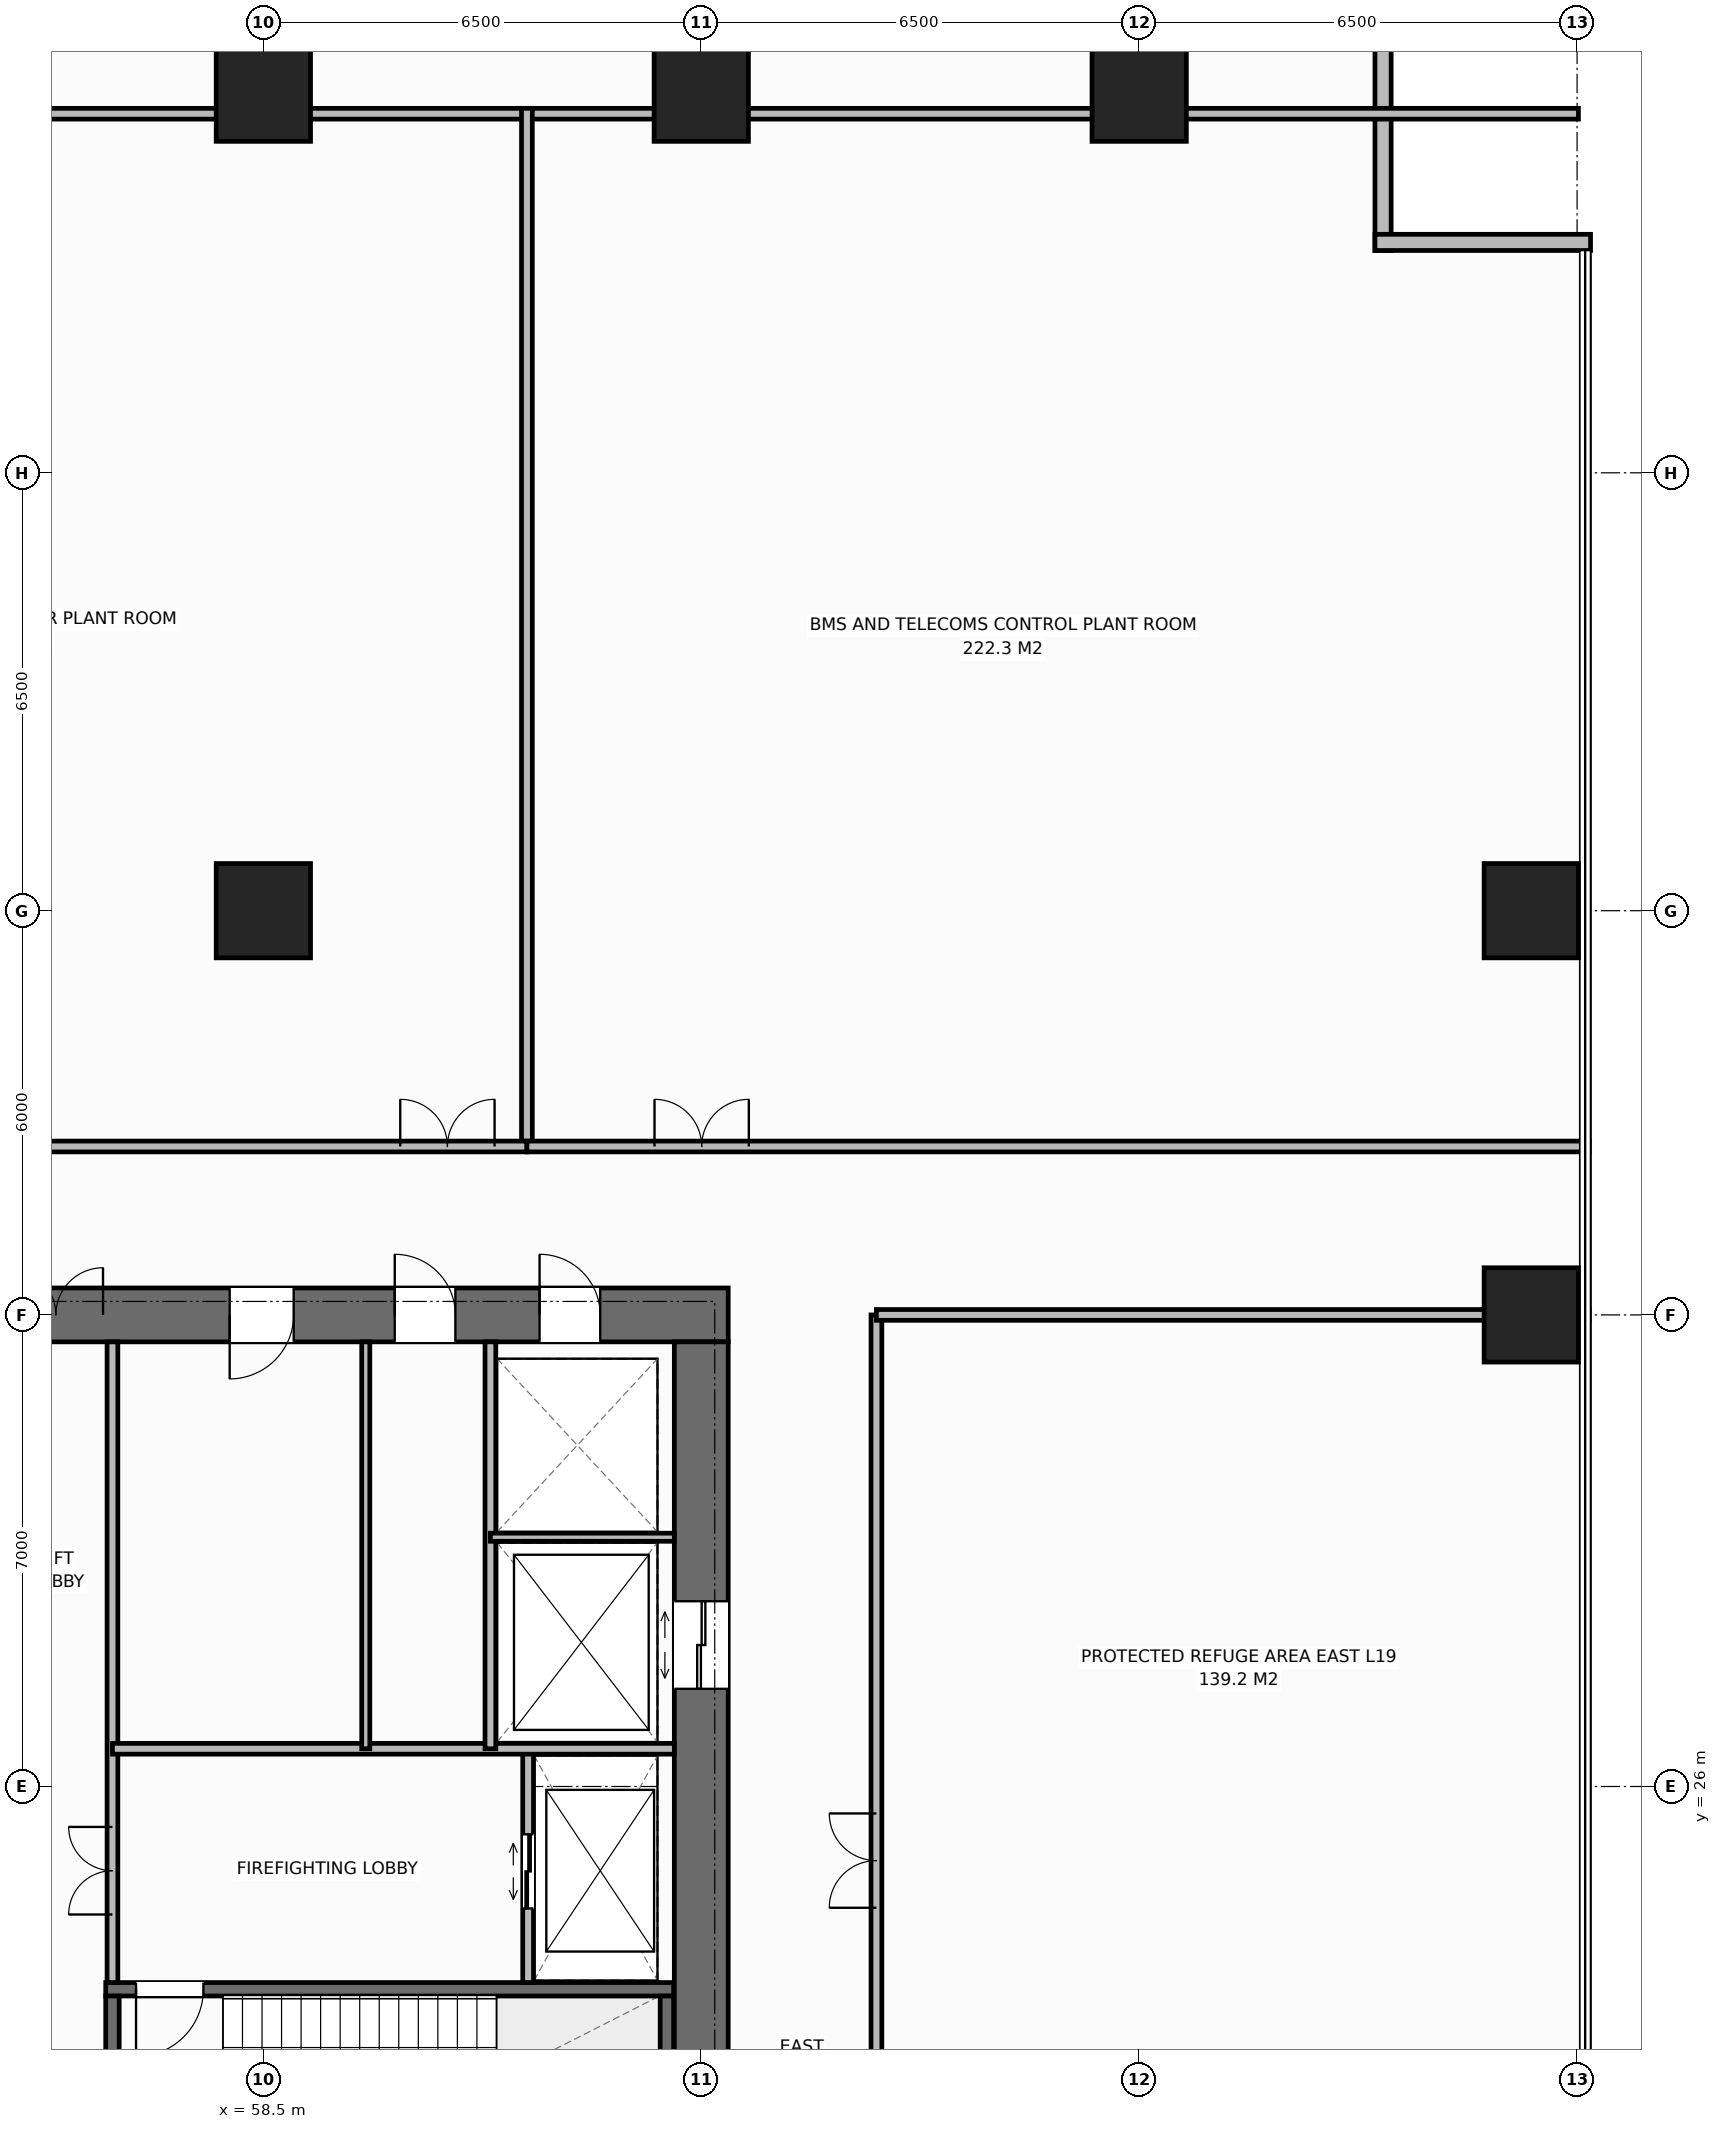
"""IFC4 building model, lengths in metres.
Left out: names, types, materials, properties, quantities, classifications, styles, units other than length and angle.
Written with IfcOpenShell. Run it as: python <this file> out.ifc"""

import sys

from ifc_helpers import new_model, si_unit, direction, frame, frame_2d, origin, origin_2d, place, context, subcontext, project, spatial, rectangle, extrude, element, fill, save


model = new_model("IFC4")
c1 = context("Model", 3, precision=1e-05, world=origin(), true_north=direction((0.0, 1.0)))
c2 = subcontext(c1, "Body", "Model", "MODEL_VIEW")
j1 = project(units=[si_unit("LENGTHUNIT", "METRE"), si_unit("PLANEANGLEUNIT", "RADIAN")], contexts=[c1])
p1 = place(None, origin())
s1 = spatial("IfcSite", under=j1, at=p1, CompositionType="ELEMENT")
p2 = place(p1, origin())
s2 = spatial("IfcBuilding", under=s1, at=p2, CompositionType="ELEMENT")
p3 = place(p2, frame((0.0, 0.0, 81.0)))
s3 = spatial("IfcBuildingStorey", under=s2, at=p3, CompositionType="ELEMENT", Elevation=81.0)
p4 = place(p3, frame((51.6, 33.0, 0.0), z_axis=(0.0, 0.0, 1.0), x_axis=(1.0, 0.0, 0.0)))
e1 = element("IfcWall", 1, at=p4, inside=s3, PredefinedType="SHEAR", context=c2, shape_type="SweptSolid", body=[
    extrude(rectangle(XDim=13.8, YDim=0.8, at=frame_2d((6.9, 0.0))), origin(), (0.0, 0.0, 1.0), 5.0),
])
p5 = place(p4, frame((3.12, 0.0, 0.0)))
e2 = element("IfcOpeningElement", 2, at=p5, cuts=e1, PredefinedType="OPENING", context=c2, shape_type="SweptSolid", body=[
    extrude(rectangle(XDim=1.4, YDim=2.2, at=frame_2d((0.7, 1.1))), frame((0.0, 0.41, 0.0), z_axis=(0.0, -1.0, 0.0), x_axis=(1.0, 0.0, 0.0)), (0.0, 0.0, 1.0), 0.82),
])
p6 = place(p4, frame((11.0, 0.0, 0.0)))
e3 = element("IfcOpeningElement", 3, at=p6, cuts=e1, PredefinedType="OPENING", context=c2, shape_type="SweptSolid", body=[
    extrude(rectangle(XDim=0.9, YDim=2.15, at=frame_2d((0.45, 1.075))), frame((0.0, 0.41, 0.0), z_axis=(0.0, -1.0, 0.0), x_axis=(1.0, 0.0, 0.0)), (0.0, 0.0, 1.0), 0.82),
])
p7 = place(p4, frame((6.4, 0.0, 0.0)))
e4 = element("IfcOpeningElement", 4, at=p7, cuts=e1, PredefinedType="OPENING", context=c2, shape_type="SweptSolid", body=[
    extrude(rectangle(XDim=0.95, YDim=2.15, at=frame_2d((0.475, 1.075))), frame((0.0, 0.41, 0.0), z_axis=(0.0, -1.0, 0.0), x_axis=(1.0, 0.0, 0.0)), (0.0, 0.0, 1.0), 0.82),
])
p8 = place(p4, frame((8.85, 0.0, 0.0)))
e5 = element("IfcOpeningElement", 5, at=p8, cuts=e1, PredefinedType="OPENING", context=c2, shape_type="SweptSolid", body=[
    extrude(rectangle(XDim=0.9, YDim=2.15, at=frame_2d((0.45, 1.075))), frame((0.0, 0.41, 0.0), z_axis=(0.0, -1.0, 0.0), x_axis=(1.0, 0.0, 0.0)), (0.0, 0.0, 1.0), 0.82),
])
p9 = place(p3, frame((65.0, 19.4, 0.0), z_axis=(0.0, 0.0, 1.0), x_axis=(0.0, 1.0, 0.0)))
e6 = element("IfcWall", 6, at=p9, inside=s3, PredefinedType="SHEAR", context=c2, shape_type="SweptSolid", body=[
    extrude(rectangle(XDim=13.2, YDim=0.8, at=frame_2d((6.6, 0.0))), origin(), (0.0, 0.0, 1.0), 5.0),
])
p10 = place(p9, frame((8.05, 0.0, 0.0)))
e7 = element("IfcOpeningElement", 7, at=p10, cuts=e6, PredefinedType="OPENING", context=c2, shape_type="SweptSolid", body=[
    extrude(rectangle(XDim=1.3, YDim=2.2, at=frame_2d((0.65, 1.1))), frame((0.0, 0.41, 0.0), z_axis=(0.0, -1.0, 0.0), x_axis=(1.0, 0.0, 0.0)), (0.0, 0.0, 1.0), 0.82),
])
p11 = place(p3, frame((56.16, 22.99, 0.0), z_axis=(0.0, 0.0, 1.0), x_axis=(1.0, 0.0, 0.0)))
e8 = element("IfcWall", 8, at=p11, inside=s3, PredefinedType="SHEAR", context=c2, shape_type="SweptSolid", body=[
    extrude(rectangle(XDim=8.43, YDim=0.2, at=frame_2d((4.215, 0.0))), origin(), (0.0, 0.0, 1.0), 5.0),
])
p12 = place(p11, frame((0.45, 0.0, 0.0)))
e9 = element("IfcOpeningElement", 9, at=p12, cuts=e8, PredefinedType="OPENING", context=c2, shape_type="SweptSolid", body=[
    extrude(rectangle(XDim=1.0, YDim=2.15, at=frame_2d((0.5, 1.075))), frame((0.0, 0.11, 0.0), z_axis=(0.0, -1.0, 0.0), x_axis=(1.0, 0.0, 0.0)), (0.0, 0.0, 1.0), 0.22),
])
for number, where, z_axis, x_axis in (
    (10, (56.26, 19.61, 0.0), (0.0, 0.0, 1.0), (0.0, 1.0, 0.0)),
    (11, (64.49, 19.61, 0.0), (0.0, 0.0, 1.0), (0.0, 1.0, 0.0)),
):
    element("IfcWall", number, at=place(p3, frame(where, z_axis=z_axis, x_axis=x_axis)), inside=s3, PredefinedType="SHEAR", context=c2, shape_type="SweptSolid", body=[
        extrude(rectangle(XDim=3.28, YDim=0.2, at=frame_2d((1.64, 0.0))), origin(), (0.0, 0.0, 1.0), 5.0),
    ])
for number, where, z_axis, x_axis in (
    (12, (58.5, 39.0, 0.0), (0.0, 0.0, 1.0), (1.0, 0.0, 0.0)),
    (13, (58.5, 51.12, 0.0), (0.0, 0.0, 1.0), (1.0, 0.0, 0.0)),
    (14, (65.0, 51.12, 0.0), (0.0, 0.0, 1.0), (1.0, 0.0, 0.0)),
    (15, (71.5, 51.12, 0.0), (0.0, 0.0, 1.0), (1.0, 0.0, 0.0)),
    (16, (77.32, 33.0, 0.0), (0.0, 0.0, 1.0), (1.0, 0.0, 0.0)),
    (17, (77.32, 39.0, 0.0), (0.0, 0.0, 1.0), (1.0, 0.0, 0.0)),
):
    element("IfcColumn", number, at=place(p3, frame(where, z_axis=z_axis, x_axis=x_axis)), inside=s3, PredefinedType="COLUMN", context=c2, shape_type="SweptSolid", body=[
        extrude(rectangle(XDim=1.4, YDim=1.4, at=origin_2d()), origin(), (0.0, 0.0, 1.0), 5.0),
    ])
for number, where, z_axis, x_axis in (
    (18, (75.12, 52.0, 0.0), (0.0, 0.0, 1.0), (0.0, -1.0, 0.0)),
    (19, (75.0, 48.92, 0.0), (0.0, 0.0, 1.0), (1.0, 0.0, 0.0)),
):
    element("IfcWall", number, at=place(p3, frame(where, z_axis=z_axis, x_axis=x_axis)), inside=s3, PredefinedType="STANDARD", context=c2, shape_type="SweptSolid", body=[
        extrude(rectangle(XDim=3.2, YDim=0.24, at=frame_2d((1.6, 0.0))), origin(), (0.0, 0.0, 1.0), 4.765),
    ])
p13 = place(p3, frame((56.26, 23.09, 0.0), z_axis=(0.0, 0.0, 1.0), x_axis=(0.0, 1.0, 0.0)))
e20 = element("IfcWall", 20, at=p13, inside=s3, PredefinedType="STANDARD", context=c2, shape_type="SweptSolid", body=[
    extrude(rectangle(XDim=9.51, YDim=0.16, at=frame_2d((4.755, 0.0))), origin(), (0.0, 0.0, 1.0), 4.765),
])
p14 = place(p13, frame((1.01, 0.0, 0.0)))
e21 = element("IfcOpeningElement", 21, at=p14, cuts=e20, PredefinedType="OPENING", context=c2, shape_type="SweptSolid", body=[
    extrude(rectangle(XDim=1.3, YDim=2.2, at=frame_2d((0.65, 1.1))), frame((0.0, 0.09, 0.0), z_axis=(0.0, -1.0, 0.0), x_axis=(1.0, 0.0, 0.0)), (0.0, 0.0, 1.0), 0.18),
])
p15 = place(p3, frame((62.43, 23.09, 0.0), z_axis=(0.0, 0.0, 1.0), x_axis=(0.0, 1.0, 0.0)))
e22 = element("IfcWall", 22, at=p15, inside=s3, PredefinedType="STANDARD", context=c2, shape_type="SweptSolid", body=[
    extrude(rectangle(XDim=3.47, YDim=0.16, at=frame_2d((1.735, 0.0))), origin(), (0.0, 0.0, 1.0), 4.765),
])
p16 = place(p15, frame((1.1, 0.0, 0.0)))
e23 = element("IfcOpeningElement", 23, at=p16, cuts=e22, PredefinedType="OPENING", context=c2, shape_type="SweptSolid", body=[
    extrude(rectangle(XDim=1.1, YDim=2.2, at=frame_2d((0.55, 1.1))), frame((0.0, 0.09, 0.0), z_axis=(0.0, -1.0, 0.0), x_axis=(1.0, 0.0, 0.0)), (0.0, 0.0, 1.0), 0.18),
])
p17 = place(p3, frame((56.26, 26.56, 0.0), z_axis=(0.0, 0.0, 1.0), x_axis=(1.0, 0.0, 0.0)))
e24 = element("IfcWall", 24, at=p17, inside=s3, PredefinedType="STANDARD", context=c2, shape_type="SweptSolid", body=[
    extrude(rectangle(XDim=8.34, YDim=0.16, at=frame_2d((4.17, 0.0))), origin(), (0.0, 0.0, 1.0), 4.765),
])
p18 = place(p3, frame((61.87, 26.56, 0.0), z_axis=(0.0, 0.0, 1.0), x_axis=(0.0, 1.0, 0.0)))
e25 = element("IfcWall", 25, at=p18, inside=s3, PredefinedType="STANDARD", context=c2, shape_type="SweptSolid", body=[
    extrude(rectangle(XDim=6.04, YDim=0.16, at=frame_2d((3.02, 0.0))), origin(), (0.0, 0.0, 1.0), 4.765),
])
p19 = place(p3, frame((61.87, 29.7, 0.0), z_axis=(0.0, 0.0, 1.0), x_axis=(1.0, 0.0, 0.0)))
e26 = element("IfcWall", 26, at=p19, inside=s3, PredefinedType="PARTITIONING", context=c2, shape_type="SweptSolid", body=[
    extrude(rectangle(XDim=2.73, YDim=0.12, at=frame_2d((1.365, 0.0))), origin(), (0.0, 0.0, 1.0), 4.765),
])
p20 = place(p3, frame((60.02, 26.56, 0.0), z_axis=(0.0, 0.0, 1.0), x_axis=(0.0, 1.0, 0.0)))
e27 = element("IfcWall", 27, at=p20, inside=s3, PredefinedType="PARTITIONING", context=c2, shape_type="SweptSolid", body=[
    extrude(rectangle(XDim=6.04, YDim=0.12, at=frame_2d((3.02, 0.0))), origin(), (0.0, 0.0, 1.0), 4.765),
])
p21 = place(p3, frame((-0.02, 50.83, 0.0), z_axis=(0.0, 0.0, 1.0), x_axis=(1.0, 0.0, 0.0)))
e28 = element("IfcWall", 28, at=p21, inside=s3, PredefinedType="STANDARD", context=c2, shape_type="SweptSolid", body=[
    extrude(rectangle(XDim=78.04, YDim=0.16, at=frame_2d((39.02, 0.0))), origin(), (0.0, 0.0, 1.0), 4.765),
])
p22 = place(p3, frame((67.6, 19.0, 0.0), z_axis=(0.0, 0.0, 1.0), x_axis=(0.0, 1.0, 0.0)))
e29 = element("IfcWall", 29, at=p22, inside=s3, PredefinedType="STANDARD", context=c2, shape_type="SweptSolid", body=[
    extrude(rectangle(XDim=14.0, YDim=0.16, at=frame_2d((7.0, 0.0))), origin(), (0.0, 0.0, 1.0), 4.765),
])
p23 = place(p22, frame((5.2, 0.0, 0.0)))
e30 = element("IfcOpeningElement", 30, at=p23, cuts=e29, PredefinedType="OPENING", context=c2, shape_type="SweptSolid", body=[
    extrude(rectangle(XDim=1.4, YDim=2.2, at=frame_2d((0.7, 1.1))), frame((0.0, 0.09, 0.0), z_axis=(0.0, -1.0, 0.0), x_axis=(1.0, 0.0, 0.0)), (0.0, 0.0, 1.0), 0.18),
])
p24 = place(p3, frame((67.6, 33.0, 0.0), z_axis=(0.0, 0.0, 1.0), x_axis=(1.0, 0.0, 0.0)))
e31 = element("IfcWall", 31, at=p24, inside=s3, PredefinedType="STANDARD", context=c2, shape_type="SweptSolid", body=[
    extrude(rectangle(XDim=10.58, YDim=0.16, at=frame_2d((5.29, 0.0))), origin(), (0.0, 0.0, 1.0), 3.245),
])
p25 = place(p3, frame((62.412, 35.5, 0.0), z_axis=(0.0, 0.0, 1.0), x_axis=(0.0, 1.0, 0.0)))
e32 = element("IfcWall", 32, at=p25, inside=s3, PredefinedType="STANDARD", context=c2, shape_type="SweptSolid", body=[
    extrude(rectangle(XDim=15.41, YDim=0.16, at=frame_2d((7.705, 0.0))), origin(), (0.0, 0.0, 1.0), 4.765),
])
p26 = place(p3, frame((43.682, 35.5, 0.0), z_axis=(0.0, 0.0, 1.0), x_axis=(1.0, 0.0, 0.0)))
e33 = element("IfcWall", 33, at=p26, inside=s3, PredefinedType="STANDARD", context=c2, shape_type="SweptSolid", body=[
    extrude(rectangle(XDim=18.73, YDim=0.16, at=frame_2d((9.365, 0.0))), origin(), (0.0, 0.0, 1.0), 4.765),
])
p27 = place(p26, frame((16.85, 0.0, 0.0)))
e34 = element("IfcOpeningElement", 34, at=p27, cuts=e33, PredefinedType="OPENING", context=c2, shape_type="SweptSolid", body=[
    extrude(rectangle(XDim=1.4, YDim=2.2, at=frame_2d((0.7, 1.1))), frame((0.0, 0.09, 0.0), z_axis=(0.0, -1.0, 0.0), x_axis=(1.0, 0.0, 0.0)), (0.0, 0.0, 1.0), 0.18),
])
p28 = place(p3, frame((62.412, 35.5, 0.0), z_axis=(0.0, 0.0, 1.0), x_axis=(1.0, 0.0, 0.0)))
e35 = element("IfcWall", 35, at=p28, inside=s3, PredefinedType="STANDARD", context=c2, shape_type="SweptSolid", body=[
    extrude(rectangle(XDim=15.768, YDim=0.16, at=frame_2d((7.884, 0.0))), origin(), (0.0, 0.0, 1.0), 4.765),
])
p29 = place(p28, frame((1.894, 0.0, 0.0)))
e36 = element("IfcOpeningElement", 36, at=p29, cuts=e35, PredefinedType="OPENING", context=c2, shape_type="SweptSolid", body=[
    extrude(rectangle(XDim=1.4, YDim=2.2, at=frame_2d((0.7, 1.1))), frame((0.0, 0.09, 0.0), z_axis=(0.0, -1.0, 0.0), x_axis=(1.0, 0.0, 0.0)), (0.0, 0.0, 1.0), 0.18),
])
p30 = place(p5, origin())
e37 = element("IfcDoor", 37, at=p30, inside=s3, OperationType="DOUBLE_DOOR_SINGLE_SWING", PredefinedType="DOOR", context=c2, shape_type="SweptSolid", body=[
    extrude(rectangle(XDim=1.4, YDim=2.2, at=frame_2d((0.7, 1.1))), frame((0.0, -0.075, 0.0), z_axis=(0.0, -1.0, 0.0), x_axis=(1.0, 0.0, 0.0)), (0.0, 0.0, 1.0), 0.05),
])
fill(e2, e37)
p31 = place(p12, origin())
e38 = element("IfcDoor", 38, at=p31, inside=s3, OperationType="SINGLE_SWING_RIGHT", PredefinedType="DOOR", context=c2, shape_type="SweptSolid", body=[
    extrude(rectangle(XDim=1.0, YDim=2.15, at=frame_2d((0.5, 1.075))), frame((0.0, 0.025, 0.0), z_axis=(0.0, -1.0, 0.0), x_axis=(1.0, 0.0, 0.0)), (0.0, 0.0, 1.0), 0.05),
])
fill(e9, e38)
p32 = place(p16, origin())
e39 = element("IfcDoor", 39, at=p32, inside=s3, OperationType="DOUBLE_DOOR_SLIDING", PredefinedType="DOOR", context=c2, shape_type="SweptSolid", body=[
    extrude(rectangle(XDim=1.1, YDim=2.2, at=frame_2d((0.55, 1.1))), frame((0.0, 0.025, 0.0), z_axis=(0.0, -1.0, 0.0), x_axis=(1.0, 0.0, 0.0)), (0.0, 0.0, 1.0), 0.05),
])
fill(e23, e39)
p33 = place(p14, origin())
e40 = element("IfcDoor", 40, at=p33, inside=s3, OperationType="DOUBLE_DOOR_SINGLE_SWING", PredefinedType="DOOR", context=c2, shape_type="SweptSolid", body=[
    extrude(rectangle(XDim=1.3, YDim=2.2, at=frame_2d((0.65, 1.1))), frame((0.0, 0.025, 0.0), z_axis=(0.0, -1.0, 0.0), x_axis=(1.0, 0.0, 0.0)), (0.0, 0.0, 1.0), 0.05),
])
fill(e21, e40)
p34 = place(p10, origin())
e41 = element("IfcDoor", 41, at=p34, inside=s3, OperationType="DOUBLE_DOOR_SLIDING", PredefinedType="DOOR", context=c2, shape_type="SweptSolid", body=[
    extrude(rectangle(XDim=1.3, YDim=2.2, at=frame_2d((0.65, 1.1))), frame((0.0, 0.025, 0.0), z_axis=(0.0, -1.0, 0.0), x_axis=(1.0, 0.0, 0.0)), (0.0, 0.0, 1.0), 0.05),
])
fill(e7, e41)
p35 = place(p6, origin())
e42 = element("IfcDoor", 42, at=p35, inside=s3, OperationType="SINGLE_SWING_LEFT", PredefinedType="DOOR", context=c2, shape_type="SweptSolid", body=[
    extrude(rectangle(XDim=0.9, YDim=2.15, at=frame_2d((0.45, 1.075))), frame((0.0, -0.075, 0.0), z_axis=(0.0, -1.0, 0.0), x_axis=(1.0, 0.0, 0.0)), (0.0, 0.0, 1.0), 0.05),
])
fill(e3, e42)
p36 = place(p7, origin())
e43 = element("IfcDoor", 43, at=p36, inside=s3, OperationType="SINGLE_SWING_RIGHT", PredefinedType="DOOR", context=c2, shape_type="SweptSolid", body=[
    extrude(rectangle(XDim=0.95, YDim=2.15, at=frame_2d((0.475, 1.075))), frame((0.0, -0.075, 0.0), z_axis=(0.0, -1.0, 0.0), x_axis=(1.0, 0.0, 0.0)), (0.0, 0.0, 1.0), 0.05),
])
fill(e4, e43)
p37 = place(p8, origin())
e44 = element("IfcDoor", 44, at=p37, inside=s3, OperationType="SINGLE_SWING_LEFT", PredefinedType="DOOR", context=c2, shape_type="SweptSolid", body=[
    extrude(rectangle(XDim=0.9, YDim=2.15, at=frame_2d((0.45, 1.075))), frame((0.0, -0.075, 0.0), z_axis=(0.0, -1.0, 0.0), x_axis=(1.0, 0.0, 0.0)), (0.0, 0.0, 1.0), 0.05),
])
fill(e5, e44)
p38 = place(p23, origin())
e45 = element("IfcDoor", 45, at=p38, inside=s3, OperationType="DOUBLE_DOOR_SINGLE_SWING", PredefinedType="DOOR", context=c2, shape_type="SweptSolid", body=[
    extrude(rectangle(XDim=1.4, YDim=2.2, at=frame_2d((0.7, 1.1))), frame((0.0, 0.025, 0.0), z_axis=(0.0, -1.0, 0.0), x_axis=(1.0, 0.0, 0.0)), (0.0, 0.0, 1.0), 0.05),
])
fill(e30, e45)
p39 = place(p27, origin())
e46 = element("IfcDoor", 46, at=p39, inside=s3, OperationType="DOUBLE_DOOR_SINGLE_SWING", PredefinedType="DOOR", context=c2, shape_type="SweptSolid", body=[
    extrude(rectangle(XDim=1.4, YDim=2.2, at=frame_2d((0.7, 1.1))), frame((0.0, 0.025, 0.0), z_axis=(0.0, -1.0, 0.0), x_axis=(1.0, 0.0, 0.0)), (0.0, 0.0, 1.0), 0.05),
])
fill(e34, e46)
p40 = place(p29, origin())
e47 = element("IfcDoor", 47, at=p40, inside=s3, OperationType="DOUBLE_DOOR_SINGLE_SWING", PredefinedType="DOOR", context=c2, shape_type="SweptSolid", body=[
    extrude(rectangle(XDim=1.4, YDim=2.2, at=frame_2d((0.7, 1.1))), frame((0.0, 0.025, 0.0), z_axis=(0.0, -1.0, 0.0), x_axis=(1.0, 0.0, 0.0)), (0.0, 0.0, 1.0), 0.05),
])
fill(e36, e47)
save(model, sys.argv[1])
